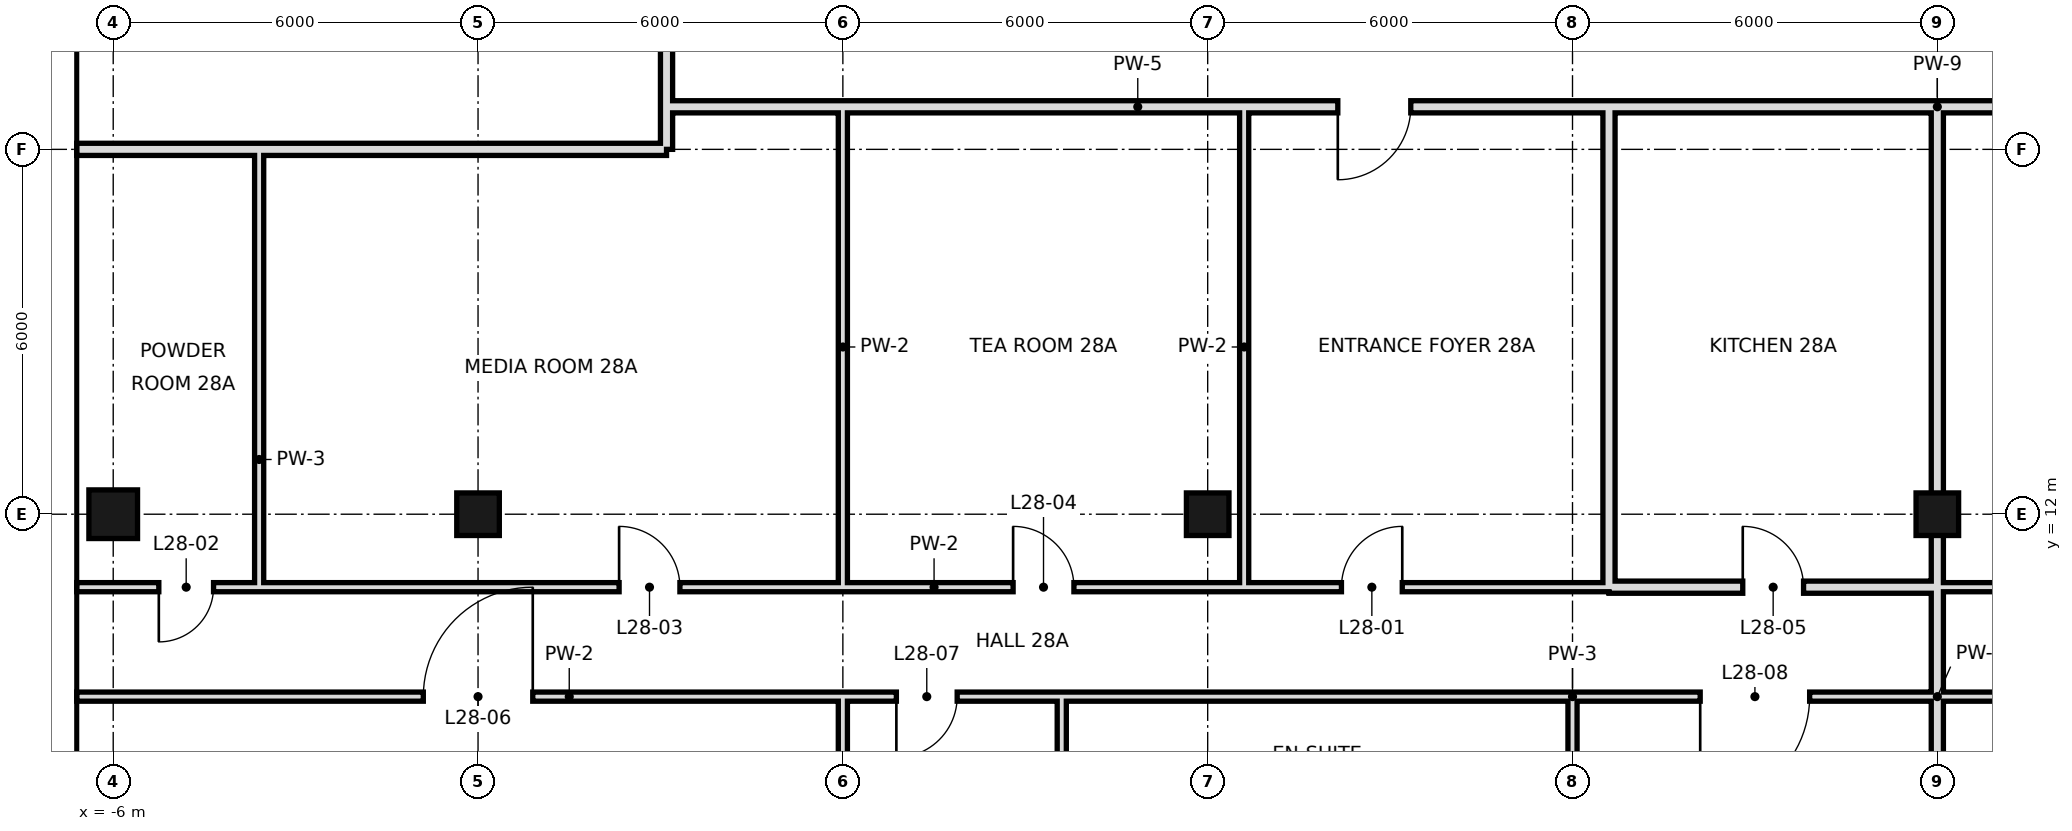
"""IFC4 building model, lengths in metres.
Left out: names, types, materials, properties, quantities, classifications, styles, units other than length and angle.
Written with IfcOpenShell. Run it as: python <this file> out.ifc"""

import sys

from ifc_helpers import new_model, si_unit, direction, frame, frame_2d, origin, origin_2d, place, context, subcontext, project, spatial, rectangle, hollow_rectangle, extrude, element, fill, save


model = new_model("IFC4")
c1 = context("Model", 3, precision=1e-05, world=origin(), true_north=direction((0.0, 1.0)))
c2 = subcontext(c1, "Body", "Model", "MODEL_VIEW")
j1 = project(units=[si_unit("LENGTHUNIT", "METRE"), si_unit("PLANEANGLEUNIT", "RADIAN")], contexts=[c1])
p1 = place(None, origin())
s1 = spatial("IfcSite", under=j1, at=p1, CompositionType="ELEMENT")
p2 = place(p1, origin())
s2 = spatial("IfcBuilding", under=s1, at=p2, CompositionType="ELEMENT")
p3 = place(p2, frame((0.0, 0.0, 126.8)))
s3 = spatial("IfcBuildingStorey", under=s2, at=p3, CompositionType="ELEMENT", Elevation=126.8)
p4 = place(p3, frame((-6.0, 12.0, 0.0), z_axis=(0.0, 0.0, 1.0), x_axis=(1.0, 0.0, 0.0)))
e1 = element("IfcColumn", 1, at=p4, inside=s3, PredefinedType="COLUMN", context=c2, shape_type="SweptSolid", body=[
    extrude(hollow_rectangle(XDim=0.8, YDim=0.8, WallThickness=0.04, at=origin_2d()), origin(), (0.0, 0.0, 1.0), 3.6),
])
for number, where, z_axis, x_axis in (
    (2, (0.0, 12.0, 0.0), (0.0, 0.0, 1.0), (1.0, 0.0, 0.0)),
    (3, (12.0, 12.0, 0.0), (0.0, 0.0, 1.0), (1.0, 0.0, 0.0)),
    (4, (24.0, 12.0, 0.0), (0.0, 0.0, 1.0), (1.0, 0.0, 0.0)),
):
    element("IfcColumn", number, at=place(p3, frame(where, z_axis=z_axis, x_axis=x_axis)), inside=s3, PredefinedType="COLUMN", context=c2, shape_type="SweptSolid", body=[
        extrude(hollow_rectangle(XDim=0.7, YDim=0.7, WallThickness=0.036, at=origin_2d()), origin(), (0.0, 0.0, 1.0), 3.6),
    ])
p5 = place(p3, frame((-3.6, 10.8, 0.0), z_axis=(0.0, 0.0, 1.0), x_axis=(0.0, 1.0, 0.0)))
e5 = element("IfcWall", 5, at=p5, inside=s3, PredefinedType="PARTITIONING", context=c2, shape_type="SweptSolid", body=[
    extrude(rectangle(XDim=7.2, YDim=0.15, at=frame_2d((3.6, 0.0))), origin(), (0.0, 0.0, 1.0), 3.42),
])
p6 = place(p3, frame((12.6, 10.8, 0.0), z_axis=(0.0, 0.0, 1.0), x_axis=(0.0, 1.0, 0.0)))
e6 = element("IfcWall", 6, at=p6, inside=s3, PredefinedType="PARTITIONING", context=c2, shape_type="SweptSolid", body=[
    extrude(rectangle(XDim=7.9, YDim=0.15, at=frame_2d((3.95, 0.0))), origin(), (0.0, 0.0, 1.0), 3.42),
])
p7 = place(p3, frame((18.0, 6.0, 0.0), z_axis=(0.0, 0.0, 1.0), x_axis=(0.0, 1.0, 0.0)))
e7 = element("IfcWall", 7, at=p7, inside=s3, PredefinedType="PARTITIONING", context=c2, shape_type="SweptSolid", body=[
    extrude(rectangle(XDim=3.0, YDim=0.15, at=frame_2d((1.5, 0.0))), origin(), (0.0, 0.0, 1.0), 2.72),
])
for number, where, z_axis, x_axis in (
    (8, (18.6, 10.8, 0.0), (0.0, 0.0, 1.0), (0.0, 1.0, 0.0)),
    (9, (24.0, 10.8, 0.0), (0.0, 0.0, 1.0), (0.0, 1.0, 0.0)),
):
    element("IfcWall", number, at=place(p3, frame(where, z_axis=z_axis, x_axis=x_axis)), inside=s3, PredefinedType="SOLIDWALL", context=c2, shape_type="SweptSolid", body=[
        extrude(rectangle(XDim=7.9, YDim=0.2, at=frame_2d((3.95, 0.0))), origin(), (0.0, 0.0, 1.0), 2.72),
    ])
p8 = place(p3, frame((24.0, 0.0, 0.0), z_axis=(0.0, 0.0, 1.0), x_axis=(0.0, 1.0, 0.0)))
e10 = element("IfcWall", 10, at=p8, inside=s3, PredefinedType="SOLIDWALL", context=c2, shape_type="SweptSolid", body=[
    extrude(rectangle(XDim=10.8, YDim=0.2, at=frame_2d((5.4, 0.0))), origin(), (0.0, 0.0, 1.0), 2.72),
])
p9 = place(p3, frame((3.1, 18.0, 0.0), z_axis=(0.0, 0.0, 1.0), x_axis=(0.0, 1.0, 0.0)))
e11 = element("IfcWall", 11, at=p9, inside=s3, PredefinedType="SOLIDWALL", context=c2, shape_type="SweptSolid", body=[
    extrude(rectangle(XDim=30.6, YDim=0.2, at=frame_2d((15.3, 0.0))), origin(), (0.0, 0.0, 1.0), 2.72),
])
p10 = place(p9, frame((14.75, 0.0, 0.0)))
e12 = element("IfcOpeningElement", 12, at=p10, cuts=e11, PredefinedType="OPENING", context=c2, shape_type="SweptSolid", body=[
    extrude(rectangle(XDim=1.2, YDim=2.4, at=frame_2d((0.6, 1.2))), frame((0.0, 0.11, 0.0), z_axis=(0.0, -1.0, 0.0), x_axis=(1.0, 0.0, 0.0)), (0.0, 0.0, 1.0), 0.22),
])
p11 = place(p3, frame((6.0, -0.6, 0.0), z_axis=(0.0, 0.0, 1.0), x_axis=(0.0, 1.0, 0.0)))
e13 = element("IfcWall", 13, at=p11, inside=s3, PredefinedType="PARTITIONING", context=c2, shape_type="SweptSolid", body=[
    extrude(rectangle(XDim=9.6, YDim=0.15, at=frame_2d((4.8, 0.0))), origin(), (0.0, 0.0, 1.0), 2.72),
])
p12 = place(p3, frame((6.0, 10.8, 0.0), z_axis=(0.0, 0.0, 1.0), x_axis=(0.0, 1.0, 0.0)))
e14 = element("IfcWall", 14, at=p12, inside=s3, PredefinedType="PARTITIONING", context=c2, shape_type="SweptSolid", body=[
    extrude(rectangle(XDim=7.9, YDim=0.15, at=frame_2d((3.95, 0.0))), origin(), (0.0, 0.0, 1.0), 2.72),
])
p13 = place(p3, frame((9.6, 6.0, 0.0), z_axis=(0.0, 0.0, 1.0), x_axis=(0.0, 1.0, 0.0)))
e15 = element("IfcWall", 15, at=p13, inside=s3, PredefinedType="PARTITIONING", context=c2, shape_type="SweptSolid", body=[
    extrude(rectangle(XDim=3.0, YDim=0.15, at=frame_2d((1.5, 0.0))), origin(), (0.0, 0.0, 1.0), 3.42),
])
p14 = place(p3, frame((18.6, 10.8, 0.0), z_axis=(0.0, 0.0, 1.0), x_axis=(1.0, 0.0, 0.0)))
e16 = element("IfcWall", 16, at=p14, inside=s3, PredefinedType="SOLIDWALL", context=c2, shape_type="SweptSolid", body=[
    extrude(rectangle(XDim=5.4, YDim=0.2, at=frame_2d((2.7, 0.0))), origin(), (0.0, 0.0, 1.0), 2.72),
])
p15 = place(p14, frame((2.2, 0.0, 0.0)))
e17 = element("IfcOpeningElement", 17, at=p15, cuts=e16, PredefinedType="OPENING", context=c2, shape_type="SweptSolid", body=[
    extrude(rectangle(XDim=1.0, YDim=2.4, at=frame_2d((0.5, 1.2))), frame((0.0, 0.11, 0.0), z_axis=(0.0, -1.0, 0.0), x_axis=(1.0, 0.0, 0.0)), (0.0, 0.0, 1.0), 0.22),
])
p16 = place(p3, frame((-3.6, 10.8, 0.0), z_axis=(0.0, 0.0, 1.0), x_axis=(1.0, 0.0, 0.0)))
e18 = element("IfcWall", 18, at=p16, inside=s3, PredefinedType="PARTITIONING", context=c2, shape_type="SweptSolid", body=[
    extrude(rectangle(XDim=22.2, YDim=0.15, at=frame_2d((11.1, 0.0))), origin(), (0.0, 0.0, 1.0), 3.42),
])
p17 = place(p16, frame((17.8, 0.0, 0.0)))
e19 = element("IfcOpeningElement", 19, at=p17, cuts=e18, PredefinedType="OPENING", context=c2, shape_type="SweptSolid", body=[
    extrude(rectangle(XDim=1.0, YDim=2.4, at=frame_2d((0.5, 1.2))), frame((0.0, 0.085, 0.0), z_axis=(0.0, -1.0, 0.0), x_axis=(1.0, 0.0, 0.0)), (0.0, 0.0, 1.0), 0.17),
])
p18 = place(p16, frame((5.92, 0.0, 0.0)))
e20 = element("IfcOpeningElement", 20, at=p18, cuts=e18, PredefinedType="OPENING", context=c2, shape_type="SweptSolid", body=[
    extrude(rectangle(XDim=1.0, YDim=2.4, at=frame_2d((0.5, 1.2))), frame((0.0, 0.085, 0.0), z_axis=(0.0, -1.0, 0.0), x_axis=(1.0, 0.0, 0.0)), (0.0, 0.0, 1.0), 0.17),
])
p19 = place(p16, frame((12.4, 0.0, 0.0)))
e21 = element("IfcOpeningElement", 21, at=p19, cuts=e18, PredefinedType="OPENING", context=c2, shape_type="SweptSolid", body=[
    extrude(rectangle(XDim=1.0, YDim=2.4, at=frame_2d((0.5, 1.2))), frame((0.0, 0.085, 0.0), z_axis=(0.0, -1.0, 0.0), x_axis=(1.0, 0.0, 0.0)), (0.0, 0.0, 1.0), 0.17),
])
p20 = place(p3, frame((24.0, 10.8, 0.0), z_axis=(0.0, 0.0, 1.0), x_axis=(1.0, 0.0, 0.0)))
e22 = element("IfcWall", 22, at=p20, inside=s3, PredefinedType="PARTITIONING", context=c2, shape_type="SweptSolid", body=[
    extrude(rectangle(XDim=6.0, YDim=0.15, at=frame_2d((3.0, 0.0))), origin(), (0.0, 0.0, 1.0), 3.42),
])
p21 = place(p20, frame((3.4, 0.0, 0.0)))
e23 = element("IfcOpeningElement", 23, at=p21, cuts=e22, PredefinedType="OPENING", context=c2, shape_type="SweptSolid", body=[
    extrude(rectangle(XDim=1.0, YDim=2.4, at=frame_2d((0.5, 1.2))), frame((0.0, 0.085, 0.0), z_axis=(0.0, -1.0, 0.0), x_axis=(1.0, 0.0, 0.0)), (0.0, 0.0, 1.0), 0.17),
])
p22 = place(p3, frame((-6.6, 10.8, 0.0), z_axis=(0.0, 0.0, 1.0), x_axis=(1.0, 0.0, 0.0)))
e24 = element("IfcWall", 24, at=p22, inside=s3, PredefinedType="PARTITIONING", context=c2, shape_type="SweptSolid", body=[
    extrude(rectangle(XDim=3.0, YDim=0.15, at=frame_2d((1.5, 0.0))), origin(), (0.0, 0.0, 1.0), 3.42),
])
p23 = place(p22, frame((1.35, 0.0, 0.0)))
e25 = element("IfcOpeningElement", 25, at=p23, cuts=e24, PredefinedType="OPENING", context=c2, shape_type="SweptSolid", body=[
    extrude(rectangle(XDim=0.9, YDim=2.4, at=frame_2d((0.45, 1.2))), frame((0.0, 0.085, 0.0), z_axis=(0.0, -1.0, 0.0), x_axis=(1.0, 0.0, 0.0)), (0.0, 0.0, 1.0), 0.17),
])
p24 = place(p3, frame((-6.6, 18.0, 0.0), z_axis=(0.0, 0.0, 1.0), x_axis=(1.0, 0.0, 0.0)))
e26 = element("IfcWall", 26, at=p24, inside=s3, PredefinedType="SOLIDWALL", context=c2, shape_type="SweptSolid", body=[
    extrude(rectangle(XDim=9.7, YDim=0.2, at=frame_2d((4.85, 0.0))), origin(), (0.0, 0.0, 1.0), 2.72),
])
p25 = place(p3, frame((3.1, 18.7, 0.0), z_axis=(0.0, 0.0, 1.0), x_axis=(1.0, 0.0, 0.0)))
e27 = element("IfcWall", 27, at=p25, inside=s3, PredefinedType="SOLIDWALL", context=c2, shape_type="SweptSolid", body=[
    extrude(rectangle(XDim=15.5, YDim=0.2, at=frame_2d((7.75, 0.0))), origin(), (0.0, 0.0, 1.0), 2.72),
])
p26 = place(p25, frame((11.04, 0.0, 0.0)))
e28 = element("IfcOpeningElement", 28, at=p26, cuts=e27, PredefinedType="OPENING", context=c2, shape_type="SweptSolid", body=[
    extrude(rectangle(XDim=1.2, YDim=2.4, at=frame_2d((0.6, 1.2))), frame((0.0, 0.11, 0.0), z_axis=(0.0, -1.0, 0.0), x_axis=(1.0, 0.0, 0.0)), (0.0, 0.0, 1.0), 0.22),
])
p27 = place(p3, frame((24.0, 18.7, 0.0), z_axis=(0.0, 0.0, 1.0), x_axis=(1.0, 0.0, 0.0)))
e29 = element("IfcWall", 29, at=p27, inside=s3, PredefinedType="SOLIDWALL", context=c2, shape_type="SweptSolid", body=[
    extrude(rectangle(XDim=6.0, YDim=0.2, at=frame_2d((3.0, 0.0))), origin(), (0.0, 0.0, 1.0), 2.72),
])
p28 = place(p27, frame((2.4, 0.0, 0.0)))
e30 = element("IfcOpeningElement", 30, at=p28, cuts=e29, PredefinedType="OPENING", context=c2, shape_type="SweptSolid", body=[
    extrude(rectangle(XDim=1.2, YDim=2.4, at=frame_2d((0.6, 1.2))), frame((0.0, 0.11, 0.0), z_axis=(0.0, -1.0, 0.0), x_axis=(1.0, 0.0, 0.0)), (0.0, 0.0, 1.0), 0.22),
])
p29 = place(p3, frame((18.6, 18.7, 0.0), z_axis=(0.0, 0.0, 1.0), x_axis=(1.0, 0.0, 0.0)))
e31 = element("IfcWall", 31, at=p29, inside=s3, PredefinedType="SOLIDWALL", context=c2, shape_type="SweptSolid", body=[
    extrude(rectangle(XDim=5.4, YDim=0.2, at=frame_2d((2.7, 0.0))), origin(), (0.0, 0.0, 1.0), 3.42),
])
p30 = place(p3, frame((-6.6, 9.0, 0.0), z_axis=(0.0, 0.0, 1.0), x_axis=(1.0, 0.0, 0.0)))
e32 = element("IfcWall", 32, at=p30, inside=s3, PredefinedType="PARTITIONING", context=c2, shape_type="SweptSolid", body=[
    extrude(rectangle(XDim=16.2, YDim=0.15, at=frame_2d((8.1, 0.0))), origin(), (0.0, 0.0, 1.0), 3.42),
])
p31 = place(p30, frame((5.7, 0.0, 0.0)))
e33 = element("IfcOpeningElement", 33, at=p31, cuts=e32, PredefinedType="OPENING", context=c2, shape_type="SweptSolid", body=[
    extrude(rectangle(XDim=1.8, YDim=2.4, at=frame_2d((0.9, 1.2))), frame((0.0, 0.085, 0.0), z_axis=(0.0, -1.0, 0.0), x_axis=(1.0, 0.0, 0.0)), (0.0, 0.0, 1.0), 0.17),
])
p32 = place(p30, frame((13.48, 0.0, 0.0)))
e34 = element("IfcOpeningElement", 34, at=p32, cuts=e32, PredefinedType="OPENING", context=c2, shape_type="SweptSolid", body=[
    extrude(rectangle(XDim=1.0, YDim=2.4, at=frame_2d((0.5, 1.2))), frame((0.0, 0.085, 0.0), z_axis=(0.0, -1.0, 0.0), x_axis=(1.0, 0.0, 0.0)), (0.0, 0.0, 1.0), 0.17),
])
p33 = place(p3, frame((18.0, 9.0, 0.0), z_axis=(0.0, 0.0, 1.0), x_axis=(1.0, 0.0, 0.0)))
e35 = element("IfcWall", 35, at=p33, inside=s3, PredefinedType="PARTITIONING", context=c2, shape_type="SweptSolid", body=[
    extrude(rectangle(XDim=12.0, YDim=0.15, at=frame_2d((6.0, 0.0))), origin(), (0.0, 0.0, 1.0), 3.42),
])
p34 = place(p33, frame((2.1, 0.0, 0.0)))
e36 = element("IfcOpeningElement", 36, at=p34, cuts=e35, PredefinedType="OPENING", context=c2, shape_type="SweptSolid", body=[
    extrude(rectangle(XDim=1.8, YDim=2.4, at=frame_2d((0.9, 1.2))), frame((0.0, 0.085, 0.0), z_axis=(0.0, -1.0, 0.0), x_axis=(1.0, 0.0, 0.0)), (0.0, 0.0, 1.0), 0.17),
])
p35 = place(p33, frame((7.6, 0.0, 0.0)))
e37 = element("IfcOpeningElement", 37, at=p35, cuts=e35, PredefinedType="OPENING", context=c2, shape_type="SweptSolid", body=[
    extrude(rectangle(XDim=1.0, YDim=2.4, at=frame_2d((0.5, 1.2))), frame((0.0, 0.085, 0.0), z_axis=(0.0, -1.0, 0.0), x_axis=(1.0, 0.0, 0.0)), (0.0, 0.0, 1.0), 0.17),
])
p36 = place(p3, frame((9.6, 9.0, 0.0), z_axis=(0.0, 0.0, 1.0), x_axis=(1.0, 0.0, 0.0)))
e38 = element("IfcWall", 38, at=p36, inside=s3, PredefinedType="PARTITIONING", context=c2, shape_type="SweptSolid", body=[
    extrude(rectangle(XDim=8.4, YDim=0.15, at=frame_2d((4.2, 0.0))), origin(), (0.0, 0.0, 1.0), 3.42),
])
p37 = place(p17, frame((1.0, 0.0, 0.0), z_axis=(0.0, 0.0, 1.0), x_axis=(-1.0, 0.0, 0.0)))
e39 = element("IfcDoor", 39, at=p37, inside=s3, OperationType="SINGLE_SWING_LEFT", PredefinedType="DOOR", context=c2, shape_type="SweptSolid", body=[
    extrude(rectangle(XDim=1.0, YDim=2.4, at=frame_2d((0.5, 1.2))), frame((0.0, 0.025, 0.0), z_axis=(0.0, -1.0, 0.0), x_axis=(1.0, 0.0, 0.0)), (0.0, 0.0, 1.0), 0.05),
])
fill(e19, e39)
p38 = place(p23, frame((0.9, 0.0, 0.0), z_axis=(0.0, 0.0, 1.0), x_axis=(-1.0, 0.0, 0.0)))
e40 = element("IfcDoor", 40, at=p38, inside=s3, OperationType="SINGLE_SWING_RIGHT", PredefinedType="DOOR", context=c2, shape_type="SweptSolid", body=[
    extrude(rectangle(XDim=0.9, YDim=2.4, at=frame_2d((0.45, 1.2))), frame((0.0, 0.025, 0.0), z_axis=(0.0, -1.0, 0.0), x_axis=(1.0, 0.0, 0.0)), (0.0, 0.0, 1.0), 0.05),
])
fill(e25, e40)
p39 = place(p18, origin())
e41 = element("IfcDoor", 41, at=p39, inside=s3, OperationType="SINGLE_SWING_LEFT", PredefinedType="DOOR", context=c2, shape_type="SweptSolid", body=[
    extrude(rectangle(XDim=1.0, YDim=2.4, at=frame_2d((0.5, 1.2))), frame((0.0, 0.025, 0.0), z_axis=(0.0, -1.0, 0.0), x_axis=(1.0, 0.0, 0.0)), (0.0, 0.0, 1.0), 0.05),
])
fill(e20, e41)
p40 = place(p19, origin())
e42 = element("IfcDoor", 42, at=p40, inside=s3, OperationType="SINGLE_SWING_LEFT", PredefinedType="DOOR", context=c2, shape_type="SweptSolid", body=[
    extrude(rectangle(XDim=1.0, YDim=2.4, at=frame_2d((0.5, 1.2))), frame((0.0, 0.025, 0.0), z_axis=(0.0, -1.0, 0.0), x_axis=(1.0, 0.0, 0.0)), (0.0, 0.0, 1.0), 0.05),
])
fill(e21, e42)
p41 = place(p15, origin())
e43 = element("IfcDoor", 43, at=p41, inside=s3, OperationType="SINGLE_SWING_LEFT", PredefinedType="DOOR", context=c2, shape_type="SweptSolid", body=[
    extrude(rectangle(XDim=1.0, YDim=2.4, at=frame_2d((0.5, 1.2))), frame((0.0, 0.025, 0.0), z_axis=(0.0, -1.0, 0.0), x_axis=(1.0, 0.0, 0.0)), (0.0, 0.0, 1.0), 0.05),
])
fill(e17, e43)
p42 = place(p31, frame((1.8, 0.0, 0.0), z_axis=(0.0, 0.0, 1.0), x_axis=(-1.0, 0.0, 0.0)))
e44 = element("IfcDoor", 44, at=p42, inside=s3, OperationType="SINGLE_SWING_LEFT", PredefinedType="DOOR", context=c2, shape_type="SweptSolid", body=[
    extrude(rectangle(XDim=1.8, YDim=2.4, at=frame_2d((0.9, 1.2))), frame((0.0, 0.025, 0.0), z_axis=(0.0, -1.0, 0.0), x_axis=(1.0, 0.0, 0.0)), (0.0, 0.0, 1.0), 0.05),
])
fill(e33, e44)
p43 = place(p32, frame((1.0, 0.0, 0.0), z_axis=(0.0, 0.0, 1.0), x_axis=(-1.0, 0.0, 0.0)))
e45 = element("IfcDoor", 45, at=p43, inside=s3, OperationType="SINGLE_SWING_RIGHT", PredefinedType="DOOR", context=c2, shape_type="SweptSolid", body=[
    extrude(rectangle(XDim=1.0, YDim=2.4, at=frame_2d((0.5, 1.2))), frame((0.0, 0.025, 0.0), z_axis=(0.0, -1.0, 0.0), x_axis=(1.0, 0.0, 0.0)), (0.0, 0.0, 1.0), 0.05),
])
fill(e34, e45)
p44 = place(p34, frame((1.8, 0.0, 0.0), z_axis=(0.0, 0.0, 1.0), x_axis=(-1.0, 0.0, 0.0)))
e46 = element("IfcDoor", 46, at=p44, inside=s3, OperationType="SINGLE_SWING_RIGHT", PredefinedType="DOOR", context=c2, shape_type="SweptSolid", body=[
    extrude(rectangle(XDim=1.8, YDim=2.4, at=frame_2d((0.9, 1.2))), frame((0.0, 0.025, 0.0), z_axis=(0.0, -1.0, 0.0), x_axis=(1.0, 0.0, 0.0)), (0.0, 0.0, 1.0), 0.05),
])
fill(e36, e46)
p45 = place(p26, frame((1.2, 0.0, 0.0), z_axis=(0.0, 0.0, 1.0), x_axis=(-1.0, 0.0, 0.0)))
e47 = element("IfcDoor", 47, at=p45, inside=s3, OperationType="SINGLE_SWING_RIGHT", PredefinedType="DOOR", context=c2, shape_type="SweptSolid", body=[
    extrude(rectangle(XDim=1.2, YDim=2.4, at=frame_2d((0.6, 1.2))), frame((0.0, 0.025, 0.0), z_axis=(0.0, -1.0, 0.0), x_axis=(1.0, 0.0, 0.0)), (0.0, 0.0, 1.0), 0.05),
])
fill(e28, e47)
save(model, sys.argv[1])
